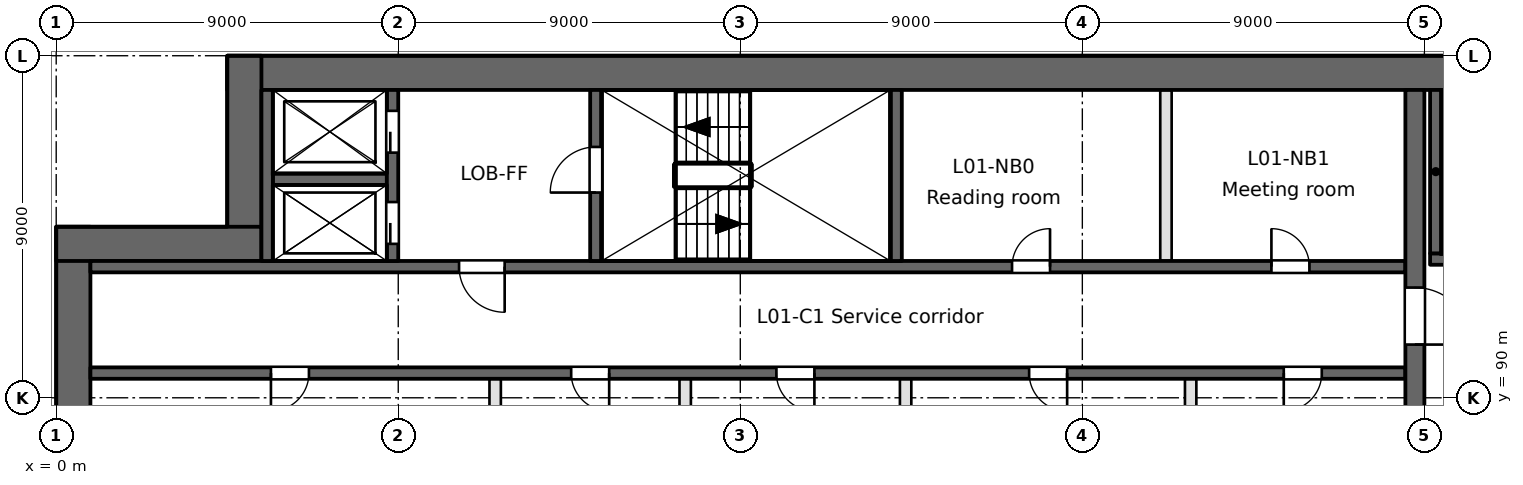
"""IFC4 building model, lengths in metres.
Left out: names, types, materials, properties, quantities, classifications, styles, units other than length and angle.
Written with IfcOpenShell. Run it as: python <this file> out.ifc"""

import sys

from ifc_helpers import new_model, si_unit, direction, frame, frame_2d, origin, place, context, subcontext, project, spatial, rectangle, extrude, element, fill, save


model = new_model("IFC4")
c1 = context("Model", 3, precision=1e-05, world=origin(), true_north=direction((0.0, 1.0)))
c2 = subcontext(c1, "Body", "Model", "MODEL_VIEW")
j1 = project(units=[si_unit("LENGTHUNIT", "METRE"), si_unit("PLANEANGLEUNIT", "RADIAN")], contexts=[c1])
p1 = place(None, origin())
s1 = spatial("IfcSite", under=j1, at=p1, CompositionType="ELEMENT")
p2 = place(p1, origin())
s2 = spatial("IfcBuilding", under=s1, at=p2, CompositionType="ELEMENT")
p3 = place(p2, frame((0.0, 0.0, 6.0)))
s3 = spatial("IfcBuildingStorey", under=s2, at=p3, CompositionType="ELEMENT", Elevation=6.0)
p4 = place(p3, frame((0.45, 94.5, 0.0), z_axis=(0.0, 0.0, 1.0), x_axis=(0.0, -1.0, 0.0)))
e1 = element("IfcWall", 1, at=p4, inside=s3, PredefinedType="SHEAR", context=c2, shape_type="SweptSolid", body=[
    extrude(rectangle(XDim=66.085, YDim=0.9, at=frame_2d((33.042, 0.0))), origin(), (0.0, 0.0, 1.0), 5.4),
])
p5 = place(p3, frame((94.5, 98.55, 0.0), z_axis=(0.0, 0.0, 1.0), x_axis=(-1.0, 0.0, 0.0)))
e2 = element("IfcWall", 2, at=p5, inside=s3, PredefinedType="SHEAR", context=c2, shape_type="SweptSolid", body=[
    extrude(rectangle(XDim=90.0, YDim=0.9, at=frame_2d((45.0, 0.0))), origin(), (0.0, 0.0, 1.0), 5.4),
])
for number, where, z_axis, x_axis in (
    (3, (4.95, 99.0, 0.0), (0.0, 0.0, 1.0), (0.0, -1.0, 0.0)),
    (4, (5.4, 94.05, 0.0), (0.0, 0.0, 1.0), (-1.0, 0.0, 0.0)),
):
    element("IfcWall", number, at=place(p3, frame(where, z_axis=z_axis, x_axis=x_axis)), inside=s3, PredefinedType="SHEAR", context=c2, shape_type="SweptSolid", body=[
        extrude(rectangle(XDim=5.4, YDim=0.9, at=frame_2d((2.7, 0.0))), origin(), (0.0, 0.0, 1.0), 5.4),
    ])
p6 = place(p3, frame((0.9, 90.65, -0.35), z_axis=(0.0, 0.0, 1.0), x_axis=(1.0, 0.0, 0.0)))
e5 = element("IfcWall", 5, at=p6, inside=s3, PredefinedType="SOLIDWALL", context=c2, shape_type="SweptSolid", body=[
    extrude(rectangle(XDim=34.6, YDim=0.3, at=frame_2d((17.3, 0.0))), origin(), (0.0, 0.0, 1.0), 5.4),
])
p7 = place(p6, frame((4.75, 0.0, 0.35)))
e6 = element("IfcOpeningElement", 6, at=p7, cuts=e5, PredefinedType="OPENING", context=c2, shape_type="SweptSolid", body=[
    extrude(rectangle(XDim=1.0, YDim=2.1, at=frame_2d((0.5, 1.05))), frame((0.0, 0.15, 0.0), z_axis=(0.0, -1.0, 0.0), x_axis=(1.0, 0.0, 0.0)), (0.0, 0.0, 1.0), 0.3),
])
p8 = place(p6, frame((24.7, 0.0, 0.35)))
e7 = element("IfcOpeningElement", 7, at=p8, cuts=e5, PredefinedType="OPENING", context=c2, shape_type="SweptSolid", body=[
    extrude(rectangle(XDim=1.0, YDim=2.1, at=frame_2d((0.5, 1.05))), frame((0.0, 0.15, 0.0), z_axis=(0.0, -1.0, 0.0), x_axis=(1.0, 0.0, 0.0)), (0.0, 0.0, 1.0), 0.3),
])
p9 = place(p6, frame((12.65, 0.0, 0.35)))
e8 = element("IfcOpeningElement", 8, at=p9, cuts=e5, PredefinedType="OPENING", context=c2, shape_type="SweptSolid", body=[
    extrude(rectangle(XDim=1.0, YDim=2.1, at=frame_2d((0.5, 1.05))), frame((0.0, 0.15, 0.0), z_axis=(0.0, -1.0, 0.0), x_axis=(1.0, 0.0, 0.0)), (0.0, 0.0, 1.0), 0.3),
])
p10 = place(p6, frame((18.05, 0.0, 0.35)))
e9 = element("IfcOpeningElement", 9, at=p10, cuts=e5, PredefinedType="OPENING", context=c2, shape_type="SweptSolid", body=[
    extrude(rectangle(XDim=1.0, YDim=2.1, at=frame_2d((0.5, 1.05))), frame((0.0, 0.15, 0.0), z_axis=(0.0, -1.0, 0.0), x_axis=(1.0, 0.0, 0.0)), (0.0, 0.0, 1.0), 0.3),
])
p11 = place(p6, frame((31.4, 0.0, 0.35)))
e10 = element("IfcOpeningElement", 10, at=p11, cuts=e5, PredefinedType="OPENING", context=c2, shape_type="SweptSolid", body=[
    extrude(rectangle(XDim=1.0, YDim=2.1, at=frame_2d((0.5, 1.05))), frame((0.0, 0.15, 0.0), z_axis=(0.0, -1.0, 0.0), x_axis=(1.0, 0.0, 0.0)), (0.0, 0.0, 1.0), 0.3),
])
p12 = place(p3, frame((0.9, 93.45, -0.35), z_axis=(0.0, 0.0, 1.0), x_axis=(1.0, 0.0, 0.0)))
e11 = element("IfcWall", 11, at=p12, inside=s3, PredefinedType="SOLIDWALL", context=c2, shape_type="SweptSolid", body=[
    extrude(rectangle(XDim=34.6, YDim=0.3, at=frame_2d((17.3, 0.0))), origin(), (0.0, 0.0, 1.0), 5.4),
])
p13 = place(p12, frame((9.7, 0.0, 0.35)))
e12 = element("IfcOpeningElement", 12, at=p13, cuts=e11, PredefinedType="OPENING", context=c2, shape_type="SweptSolid", body=[
    extrude(rectangle(XDim=1.2, YDim=2.1, at=frame_2d((0.6, 1.05))), frame((0.0, 0.15, 0.0), z_axis=(0.0, -1.0, 0.0), x_axis=(1.0, 0.0, 0.0)), (0.0, 0.0, 1.0), 0.3),
])
p14 = place(p12, frame((24.25, 0.0, 0.35)))
e13 = element("IfcOpeningElement", 13, at=p14, cuts=e11, PredefinedType="OPENING", context=c2, shape_type="SweptSolid", body=[
    extrude(rectangle(XDim=1.0, YDim=2.1, at=frame_2d((0.5, 1.05))), frame((0.0, 0.15, 0.0), z_axis=(0.0, -1.0, 0.0), x_axis=(1.0, 0.0, 0.0)), (0.0, 0.0, 1.0), 0.3),
])
p15 = place(p12, frame((31.075, 0.0, 0.35)))
e14 = element("IfcOpeningElement", 14, at=p15, cuts=e11, PredefinedType="OPENING", context=c2, shape_type="SweptSolid", body=[
    extrude(rectangle(XDim=1.0, YDim=2.1, at=frame_2d((0.5, 1.05))), frame((0.0, 0.15, 0.0), z_axis=(0.0, -1.0, 0.0), x_axis=(1.0, 0.0, 0.0)), (0.0, 0.0, 1.0), 0.3),
])
p16 = place(p3, frame((36.15, 93.65, -0.35), z_axis=(0.0, 0.0, 1.0), x_axis=(1.0, 0.0, 0.0)))
e15 = element("IfcWall", 15, at=p16, inside=s3, PredefinedType="SOLIDWALL", context=c2, shape_type="SweptSolid", body=[
    extrude(rectangle(XDim=8.2, YDim=0.3, at=frame_2d((4.1, 0.0))), origin(), (0.0, 0.0, 1.0), 5.4),
])
p17 = place(p16, frame((0.7, 0.0, 0.35)))
e16 = element("IfcOpeningElement", 16, at=p17, cuts=e15, PredefinedType="OPENING", context=c2, shape_type="SweptSolid", body=[
    extrude(rectangle(XDim=1.2, YDim=2.1, at=frame_2d((0.6, 1.05))), frame((0.0, 0.15, 0.0), z_axis=(0.0, -1.0, 0.0), x_axis=(1.0, 0.0, 0.0)), (0.0, 0.0, 1.0), 0.3),
])
p18 = place(p3, frame((5.7, 95.75, -0.35), z_axis=(0.0, 0.0, 1.0), x_axis=(1.0, 0.0, 0.0)))
e17 = element("IfcWall", 17, at=p18, inside=s3, PredefinedType="SOLIDWALL", context=c2, shape_type="SweptSolid", body=[
    extrude(rectangle(XDim=3.0, YDim=0.3, at=frame_2d((1.5, 0.0))), origin(), (0.0, 0.0, 1.0), 5.4),
])
p19 = place(p3, frame((5.55, 93.6, -0.35), z_axis=(0.0, 0.0, 1.0), x_axis=(0.0, 1.0, 0.0)))
e18 = element("IfcWall", 18, at=p19, inside=s3, PredefinedType="SOLIDWALL", context=c2, shape_type="SweptSolid", body=[
    extrude(rectangle(XDim=4.5, YDim=0.3, at=frame_2d((2.25, 0.0))), origin(), (0.0, 0.0, 1.0), 5.4),
])
p20 = place(p3, frame((8.85, 93.6, -0.35), z_axis=(0.0, 0.0, 1.0), x_axis=(0.0, 1.0, 0.0)))
e19 = element("IfcWall", 19, at=p20, inside=s3, PredefinedType="SOLIDWALL", context=c2, shape_type="SweptSolid", body=[
    extrude(rectangle(XDim=4.5, YDim=0.3, at=frame_2d((2.25, 0.0))), origin(), (0.0, 0.0, 1.0), 5.4),
])
p21 = place(p20, frame((0.45, 0.0, 0.35)))
e20 = element("IfcOpeningElement", 20, at=p21, cuts=e19, PredefinedType="OPENING", context=c2, shape_type="SweptSolid", body=[
    extrude(rectangle(XDim=1.1, YDim=2.1, at=frame_2d((0.55, 1.05))), frame((0.0, 0.15, 0.0), z_axis=(0.0, -1.0, 0.0), x_axis=(1.0, 0.0, 0.0)), (0.0, 0.0, 1.0), 0.3),
])
p22 = place(p20, frame((2.85, 0.0, 0.35)))
e21 = element("IfcOpeningElement", 21, at=p22, cuts=e19, PredefinedType="OPENING", context=c2, shape_type="SweptSolid", body=[
    extrude(rectangle(XDim=1.1, YDim=2.1, at=frame_2d((0.55, 1.05))), frame((0.0, 0.15, 0.0), z_axis=(0.0, -1.0, 0.0), x_axis=(1.0, 0.0, 0.0)), (0.0, 0.0, 1.0), 0.3),
])
p23 = place(p3, frame((11.55, 87.95, 0.0), z_axis=(0.0, 0.0, 1.0), x_axis=(0.0, 1.0, 0.0)))
e22 = element("IfcWall", 22, at=p23, inside=s3, PredefinedType="PARTITIONING", context=c2, shape_type="SweptSolid", body=[
    extrude(rectangle(XDim=2.55, YDim=0.3, at=frame_2d((1.275, 0.0))), origin(), (0.0, 0.0, 1.0), 5.05),
])
p24 = place(p3, frame((14.2, 93.6, -0.35), z_axis=(0.0, 0.0, 1.0), x_axis=(0.0, 1.0, 0.0)))
e23 = element("IfcWall", 23, at=p24, inside=s3, PredefinedType="SOLIDWALL", context=c2, shape_type="SweptSolid", body=[
    extrude(rectangle(XDim=4.5, YDim=0.3, at=frame_2d((2.25, 0.0))), origin(), (0.0, 0.0, 1.0), 5.4),
])
p25 = place(p24, frame((1.8, 0.0, 0.35)))
e24 = element("IfcOpeningElement", 24, at=p25, cuts=e23, PredefinedType="OPENING", context=c2, shape_type="SweptSolid", body=[
    extrude(rectangle(XDim=1.2, YDim=2.1, at=frame_2d((0.6, 1.05))), frame((0.0, 0.15, 0.0), z_axis=(0.0, -1.0, 0.0), x_axis=(1.0, 0.0, 0.0)), (0.0, 0.0, 1.0), 0.3),
])
p26 = place(p3, frame((16.55, 77.55, 0.0), z_axis=(0.0, 0.0, 1.0), x_axis=(0.0, 1.0, 0.0)))
e25 = element("IfcWall", 25, at=p26, inside=s3, PredefinedType="PARTITIONING", context=c2, shape_type="SweptSolid", body=[
    extrude(rectangle(XDim=12.95, YDim=0.3, at=frame_2d((6.475, 0.0))), origin(), (0.0, 0.0, 1.0), 5.05),
])
p27 = place(p3, frame((22.1, 93.6, -0.35), z_axis=(0.0, 0.0, 1.0), x_axis=(0.0, 1.0, 0.0)))
e26 = element("IfcWall", 26, at=p27, inside=s3, PredefinedType="SOLIDWALL", context=c2, shape_type="SweptSolid", body=[
    extrude(rectangle(XDim=4.5, YDim=0.3, at=frame_2d((2.25, 0.0))), origin(), (0.0, 0.0, 1.0), 5.4),
])
p28 = place(p3, frame((22.35, 87.95, 0.0), z_axis=(0.0, 0.0, 1.0), x_axis=(0.0, 1.0, 0.0)))
e27 = element("IfcWall", 27, at=p28, inside=s3, PredefinedType="PARTITIONING", context=c2, shape_type="SweptSolid", body=[
    extrude(rectangle(XDim=2.55, YDim=0.3, at=frame_2d((1.275, 0.0))), origin(), (0.0, 0.0, 1.0), 5.05),
])
p29 = place(p3, frame((29.2, 93.6, 0.0), z_axis=(0.0, 0.0, 1.0), x_axis=(0.0, 1.0, 0.0)))
e28 = element("IfcWall", 28, at=p29, inside=s3, PredefinedType="PARTITIONING", context=c2, shape_type="SweptSolid", body=[
    extrude(rectangle(XDim=4.5, YDim=0.3, at=frame_2d((2.25, 0.0))), origin(), (0.0, 0.0, 1.0), 5.05),
])
p30 = place(p3, frame((29.85, 87.95, 0.0), z_axis=(0.0, 0.0, 1.0), x_axis=(0.0, 1.0, 0.0)))
e29 = element("IfcWall", 29, at=p30, inside=s3, PredefinedType="PARTITIONING", context=c2, shape_type="SweptSolid", body=[
    extrude(rectangle(XDim=2.55, YDim=0.3, at=frame_2d((1.275, 0.0))), origin(), (0.0, 0.0, 1.0), 5.05),
])
p31 = place(p3, frame((35.75, 63.5, -0.35), z_axis=(0.0, 0.0, 1.0), x_axis=(0.0, 1.0, 0.0)))
e30 = element("IfcWall", 30, at=p31, inside=s3, PredefinedType="SOLIDWALL", context=c2, shape_type="SweptSolid", body=[
    extrude(rectangle(XDim=34.6, YDim=0.5, at=frame_2d((17.3, 0.0))), origin(), (0.0, 0.0, 1.0), 5.4),
])
p32 = place(p31, frame((9.7, 0.0, 0.35)))
e31 = element("IfcOpeningElement", 31, at=p32, cuts=e30, PredefinedType="OPENING", context=c2, shape_type="SweptSolid", body=[
    extrude(rectangle(XDim=2.4, YDim=2.1, at=frame_2d((1.2, 1.05))), frame((0.0, 0.25, 0.0), z_axis=(0.0, -1.0, 0.0), x_axis=(1.0, 0.0, 0.0)), (0.0, 0.0, 1.0), 0.5),
])
p33 = place(p31, frame((27.9, 0.0, 0.35)))
e32 = element("IfcOpeningElement", 32, at=p33, cuts=e30, PredefinedType="OPENING", context=c2, shape_type="SweptSolid", body=[
    extrude(rectangle(XDim=1.5, YDim=2.1, at=frame_2d((0.75, 1.05))), frame((0.0, 0.25, 0.0), z_axis=(0.0, -1.0, 0.0), x_axis=(1.0, 0.0, 0.0)), (0.0, 0.0, 1.0), 0.5),
])
p34 = place(p31, frame((1.5, 0.0, 0.35)))
e33 = element("IfcOpeningElement", 33, at=p34, cuts=e30, PredefinedType="OPENING", context=c2, shape_type="SweptSolid", body=[
    extrude(rectangle(XDim=1.2, YDim=2.1, at=frame_2d((0.6, 1.05))), frame((0.0, 0.25, 0.0), z_axis=(0.0, -1.0, 0.0), x_axis=(1.0, 0.0, 0.0)), (0.0, 0.0, 1.0), 0.5),
])
p35 = place(p3, frame((36.3, 93.8, -0.35), z_axis=(0.0, 0.0, 1.0), x_axis=(0.0, 1.0, 0.0)))
e34 = element("IfcWall", 34, at=p35, inside=s3, PredefinedType="SOLIDWALL", context=c2, shape_type="SweptSolid", body=[
    extrude(rectangle(XDim=4.3, YDim=0.3, at=frame_2d((2.15, 0.0))), origin(), (0.0, 0.0, 1.0), 5.4),
])
p36 = place(p21, origin())
e35 = element("IfcDoor", 35, at=p36, inside=s3, OperationType="SLIDING_TO_RIGHT", PredefinedType="DOOR", context=c2, shape_type="SweptSolid", body=[
    extrude(rectangle(XDim=1.1, YDim=2.1, at=frame_2d((0.55, 1.05))), frame((0.0, 0.025, 0.0), z_axis=(0.0, -1.0, 0.0), x_axis=(1.0, 0.0, 0.0)), (0.0, 0.0, 1.0), 0.05),
])
fill(e20, e35)
p37 = place(p22, origin())
e36 = element("IfcDoor", 36, at=p37, inside=s3, OperationType="SLIDING_TO_LEFT", PredefinedType="DOOR", context=c2, shape_type="SweptSolid", body=[
    extrude(rectangle(XDim=1.1, YDim=2.1, at=frame_2d((0.55, 1.05))), frame((0.0, 0.025, 0.0), z_axis=(0.0, -1.0, 0.0), x_axis=(1.0, 0.0, 0.0)), (0.0, 0.0, 1.0), 0.05),
])
fill(e21, e36)
p38 = place(p13, frame((1.2, 0.0, 0.0), z_axis=(0.0, 0.0, 1.0), x_axis=(-1.0, 0.0, 0.0)))
e37 = element("IfcDoor", 37, at=p38, inside=s3, OperationType="SINGLE_SWING_LEFT", PredefinedType="DOOR", context=c2, shape_type="SweptSolid", body=[
    extrude(rectangle(XDim=1.2, YDim=2.1, at=frame_2d((0.6, 1.05))), frame((0.0, 0.025, 0.0), z_axis=(0.0, -1.0, 0.0), x_axis=(1.0, 0.0, 0.0)), (0.0, 0.0, 1.0), 0.05),
])
fill(e12, e37)
p39 = place(p33, frame((1.5, 0.0, 0.0), z_axis=(0.0, 0.0, 1.0), x_axis=(-1.0, 0.0, 0.0)))
e38 = element("IfcDoor", 38, at=p39, inside=s3, OperationType="SINGLE_SWING_RIGHT", PredefinedType="DOOR", context=c2, shape_type="SweptSolid", body=[
    extrude(rectangle(XDim=1.5, YDim=2.1, at=frame_2d((0.75, 1.05))), frame((0.0, 0.025, 0.0), z_axis=(0.0, -1.0, 0.0), x_axis=(1.0, 0.0, 0.0)), (0.0, 0.0, 1.0), 0.05),
])
fill(e32, e38)
p40 = place(p25, origin())
e39 = element("IfcDoor", 39, at=p40, inside=s3, OperationType="SINGLE_SWING_LEFT", PredefinedType="DOOR", context=c2, shape_type="SweptSolid", body=[
    extrude(rectangle(XDim=1.2, YDim=2.1, at=frame_2d((0.6, 1.05))), frame((0.0, 0.025, 0.0), z_axis=(0.0, -1.0, 0.0), x_axis=(1.0, 0.0, 0.0)), (0.0, 0.0, 1.0), 0.05),
])
fill(e24, e39)
p41 = place(p7, frame((1.0, 0.0, 0.0), z_axis=(0.0, 0.0, 1.0), x_axis=(-1.0, 0.0, 0.0)))
e40 = element("IfcDoor", 40, at=p41, inside=s3, OperationType="SINGLE_SWING_RIGHT", PredefinedType="DOOR", context=c2, shape_type="SweptSolid", body=[
    extrude(rectangle(XDim=1.0, YDim=2.1, at=frame_2d((0.5, 1.05))), frame((0.0, 0.025, 0.0), z_axis=(0.0, -1.0, 0.0), x_axis=(1.0, 0.0, 0.0)), (0.0, 0.0, 1.0), 0.05),
])
fill(e6, e40)
p42 = place(p8, frame((1.0, 0.0, 0.0), z_axis=(0.0, 0.0, 1.0), x_axis=(-1.0, 0.0, 0.0)))
e41 = element("IfcDoor", 41, at=p42, inside=s3, OperationType="SINGLE_SWING_LEFT", PredefinedType="DOOR", context=c2, shape_type="SweptSolid", body=[
    extrude(rectangle(XDim=1.0, YDim=2.1, at=frame_2d((0.5, 1.05))), frame((0.0, 0.025, 0.0), z_axis=(0.0, -1.0, 0.0), x_axis=(1.0, 0.0, 0.0)), (0.0, 0.0, 1.0), 0.05),
])
fill(e7, e41)
p43 = place(p9, frame((1.0, 0.0, 0.0), z_axis=(0.0, 0.0, 1.0), x_axis=(-1.0, 0.0, 0.0)))
e42 = element("IfcDoor", 42, at=p43, inside=s3, OperationType="SINGLE_SWING_LEFT", PredefinedType="DOOR", context=c2, shape_type="SweptSolid", body=[
    extrude(rectangle(XDim=1.0, YDim=2.1, at=frame_2d((0.5, 1.05))), frame((0.0, 0.025, 0.0), z_axis=(0.0, -1.0, 0.0), x_axis=(1.0, 0.0, 0.0)), (0.0, 0.0, 1.0), 0.05),
])
fill(e8, e42)
p44 = place(p10, frame((1.0, 0.0, 0.0), z_axis=(0.0, 0.0, 1.0), x_axis=(-1.0, 0.0, 0.0)))
e43 = element("IfcDoor", 43, at=p44, inside=s3, OperationType="SINGLE_SWING_LEFT", PredefinedType="DOOR", context=c2, shape_type="SweptSolid", body=[
    extrude(rectangle(XDim=1.0, YDim=2.1, at=frame_2d((0.5, 1.05))), frame((0.0, 0.025, 0.0), z_axis=(0.0, -1.0, 0.0), x_axis=(1.0, 0.0, 0.0)), (0.0, 0.0, 1.0), 0.05),
])
fill(e9, e43)
p45 = place(p11, frame((1.0, 0.0, 0.0), z_axis=(0.0, 0.0, 1.0), x_axis=(-1.0, 0.0, 0.0)))
e44 = element("IfcDoor", 44, at=p45, inside=s3, OperationType="SINGLE_SWING_RIGHT", PredefinedType="DOOR", context=c2, shape_type="SweptSolid", body=[
    extrude(rectangle(XDim=1.0, YDim=2.1, at=frame_2d((0.5, 1.05))), frame((0.0, 0.025, 0.0), z_axis=(0.0, -1.0, 0.0), x_axis=(1.0, 0.0, 0.0)), (0.0, 0.0, 1.0), 0.05),
])
fill(e10, e44)
p46 = place(p14, origin())
e45 = element("IfcDoor", 45, at=p46, inside=s3, OperationType="SINGLE_SWING_RIGHT", PredefinedType="DOOR", context=c2, shape_type="SweptSolid", body=[
    extrude(rectangle(XDim=1.0, YDim=2.1, at=frame_2d((0.5, 1.05))), frame((0.0, 0.025, 0.0), z_axis=(0.0, -1.0, 0.0), x_axis=(1.0, 0.0, 0.0)), (0.0, 0.0, 1.0), 0.05),
])
fill(e13, e45)
p47 = place(p15, origin())
e46 = element("IfcDoor", 46, at=p47, inside=s3, OperationType="SINGLE_SWING_LEFT", PredefinedType="DOOR", context=c2, shape_type="SweptSolid", body=[
    extrude(rectangle(XDim=1.0, YDim=2.1, at=frame_2d((0.5, 1.05))), frame((0.0, 0.025, 0.0), z_axis=(0.0, -1.0, 0.0), x_axis=(1.0, 0.0, 0.0)), (0.0, 0.0, 1.0), 0.05),
])
fill(e14, e46)
save(model, sys.argv[1])
